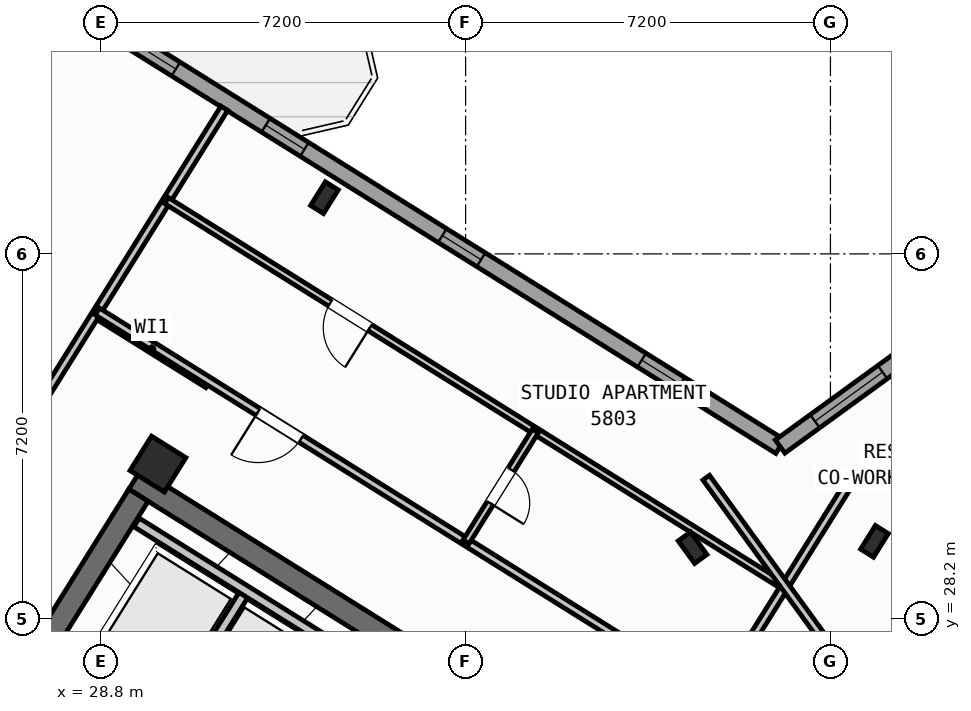
"""IFC4 building model, lengths in metres.
Left out: names, types, materials, properties, quantities, classifications, styles, units other than length and angle.
Written with IfcOpenShell. Run it as: python <this file> out.ifc"""

import sys

from ifc_helpers import new_model, si_unit, direction, frame, frame_2d, origin, origin_2d, place, context, subcontext, project, spatial, rectangle, hollow_rectangle, i_section, extrude, source, transform, mapped, element, fill, save


model = new_model("IFC4")
c1 = context("Model", 3, precision=1e-05, world=origin(), true_north=direction((0.0, 1.0)))
c2 = subcontext(c1, "Body", "Model", "MODEL_VIEW")
j1 = project(units=[si_unit("LENGTHUNIT", "METRE"), si_unit("PLANEANGLEUNIT", "RADIAN")], contexts=[c1])
p1 = place(None, origin())
s1 = spatial("IfcSite", under=j1, at=p1, CompositionType="ELEMENT")
p2 = place(p1, origin())
s2 = spatial("IfcBuilding", under=s1, at=p2, CompositionType="ELEMENT")
p3 = place(p2, frame((0.0, 0.0, 229.2)))
s3 = spatial("IfcBuildingStorey", under=s2, at=p3, CompositionType="ELEMENT", Elevation=229.2)
p4 = place(p3, frame((40.531, 24.036, 0.0), z_axis=(0.0, 0.0, 1.0), x_axis=(-0.848048787466, 0.529918157905, 0.0)))
e1 = element("IfcWall", 1, at=p4, inside=s3, PredefinedType="SHEAR", context=c2, shape_type="SweptSolid", body=[
    extrude(rectangle(XDim=13.04, YDim=0.45, at=frame_2d((6.52, 0.0))), origin(), (0.0, 0.0, 1.0), 4.22),
])
p5 = place(p3, frame((29.544, 30.636, 0.0), z_axis=(0.0, 0.0, 1.0), x_axis=(-0.529902075036, -0.848058836916, 0.0)))
e2 = element("IfcWall", 2, at=p5, inside=s3, PredefinedType="SHEAR", context=c2, shape_type="SweptSolid", body=[
    extrude(rectangle(XDim=3.625, YDim=0.45, at=frame_2d((1.812, 0.0))), origin(), (0.0, 0.0, 1.0), 4.22),
])
p6 = place(p3, frame((44.406, 24.172, 0.0), z_axis=(0.0, 0.0, 1.0), x_axis=(0.809012867805, 0.587790931986, 0.0)))
e3 = element("IfcWall", 3, at=p6, inside=s3, PredefinedType="SHEAR", context=c2, shape_type="SweptSolid", body=[
    extrude(rectangle(XDim=12.24, YDim=0.45, at=frame_2d((6.12, 0.0))), origin(), (0.0, 0.0, 1.0), 4.22),
])
m1 = source(origin(), c2, "Body", "SweptSolid", [
    extrude(i_section(OverallWidth=0.3, OverallDepth=0.55, WebThickness=0.015, FlangeThickness=0.029, at=origin_2d()), origin(), (0.0, 0.0, 1.0), 4.5),
])
for number, where, z_axis, x_axis in (
    (4, (44.068, 29.726, 0.0), (0.0, 0.0, 1.0), (-0.848, 0.53, 0.0)),
    (5, (33.213, 36.509, 0.0), (0.0, 0.0, 1.0), (-0.848, 0.53, 0.0)),
):
    element("IfcColumn", number, at=place(p3, frame(where, z_axis=z_axis, x_axis=x_axis)), inside=s3, PredefinedType="COLUMN", context=c2, shape_type="MappedRepresentation", body=[
        mapped(m1, transform((0.0, 0.0, 0.0), scale=1.0)),
    ])
m2 = source(origin(), c2, "Body", "SweptSolid", [
    extrude(hollow_rectangle(XDim=0.8, YDim=0.8, WallThickness=0.032, at=origin_2d()), origin(), (0.0, 0.0, 1.0), 4.5),
])
p7 = place(p3, frame((29.928, 31.251, 0.0), z_axis=(0.0, 0.0, 1.0), x_axis=(-0.848048096156, 0.529919264233, 0.0)))
e6 = element("IfcColumn", 6, at=p7, inside=s3, PredefinedType="COLUMN", context=c2, shape_type="MappedRepresentation", body=[
    mapped(m2, transform((0.0, 0.0, 0.0), scale=1.0)),
])
p8 = place(p3, frame((40.479, 29.601, 0.0), z_axis=(0.0, 0.0, 1.0), x_axis=(0.809016994375, 0.587785252292, 0.0)))
e7 = element("IfcColumn", 7, at=p8, inside=s3, PredefinedType="COLUMN", context=c2, shape_type="MappedRepresentation", body=[
    mapped(m1, transform((0.0, 0.0, 0.0), scale=1.0)),
])
p9 = place(p3, frame((31.76, 12.183, 0.0), z_axis=(0.0, 0.0, 1.0), x_axis=(-0.848047074256, 0.529920899612, 0.0)))
e8 = element("IfcWall", 8, at=p9, inside=s3, PredefinedType="STANDARD", context=c2, shape_type="SweptSolid", body=[
    extrude(rectangle(XDim=30.652, YDim=0.32, at=frame_2d((15.326, 0.0))), origin(), (0.0, 0.0, 1.0), 4.22),
])
p10 = place(p9, frame((14.966, 0.0, 0.0)))
e9 = element("IfcOpeningElement", 9, at=p10, cuts=e8, PredefinedType="OPENING", context=c2, shape_type="SweptSolid", body=[
    extrude(rectangle(XDim=1.2, YDim=2.15, at=frame_2d((0.6, 1.075))), frame((0.0, 0.17, 0.0), z_axis=(0.0, -1.0, 0.0), x_axis=(1.0, 0.0, 0.0)), (0.0, 0.0, 1.0), 0.34),
])
p11 = place(p9, frame((2.096, 0.0, 0.9)))
e10 = element("IfcOpeningElement", 10, at=p11, cuts=e8, PredefinedType="OPENING", context=c2, shape_type="SweptSolid", body=[
    extrude(rectangle(XDim=1.65, YDim=1.45, at=frame_2d((0.825, 0.725))), frame((0.0, 0.17, 0.0), z_axis=(0.0, -1.0, 0.0), x_axis=(1.0, 0.0, 0.0)), (0.0, 0.0, 1.0), 0.34),
])
p12 = place(p9, frame((6.771, 0.0, 0.9)))
e11 = element("IfcOpeningElement", 11, at=p12, cuts=e8, PredefinedType="OPENING", context=c2, shape_type="SweptSolid", body=[
    extrude(rectangle(XDim=1.65, YDim=1.45, at=frame_2d((0.825, 0.725))), frame((0.0, 0.17, 0.0), z_axis=(0.0, -1.0, 0.0), x_axis=(1.0, 0.0, 0.0)), (0.0, 0.0, 1.0), 0.34),
])
p13 = place(p9, frame((20.283, 0.0, 0.95)))
e12 = element("IfcOpeningElement", 12, at=p13, cuts=e8, PredefinedType="OPENING", context=c2, shape_type="SweptSolid", body=[
    extrude(rectangle(XDim=1.95, YDim=1.35, at=frame_2d((0.975, 0.675))), frame((0.0, 0.17, 0.0), z_axis=(0.0, -1.0, 0.0), x_axis=(1.0, 0.0, 0.0)), (0.0, 0.0, 1.0), 0.34),
])
p14 = place(p9, frame((27.208, 0.0, 1.0)))
e13 = element("IfcOpeningElement", 13, at=p14, cuts=e8, PredefinedType="OPENING", context=c2, shape_type="SweptSolid", body=[
    extrude(rectangle(XDim=0.9, YDim=1.25, at=frame_2d((0.45, 0.625))), frame((0.0, 0.17, 0.0), z_axis=(0.0, -1.0, 0.0), x_axis=(1.0, 0.0, 0.0)), (0.0, 0.0, 1.0), 0.34),
])
p15 = place(p3, frame((17.424, 47.083, 0.0), z_axis=(0.0, 0.0, 1.0), x_axis=(0.848049927979, -0.529916332693, 0.0)))
e14 = element("IfcWall", 14, at=p15, inside=s3, PredefinedType="STANDARD", context=c2, shape_type="SweptSolid", body=[
    extrude(rectangle(XDim=29.223, YDim=0.32, at=frame_2d((14.612, 0.0))), origin(), (0.0, 0.0, 1.0), 4.22),
])
p16 = place(p15, frame((3.709, 0.0, 0.0)))
e15 = element("IfcOpeningElement", 15, at=p16, cuts=e14, PredefinedType="OPENING", context=c2, shape_type="SweptSolid", body=[
    extrude(rectangle(XDim=1.05, YDim=2.15, at=frame_2d((0.525, 1.075))), frame((0.0, 0.17, 0.0), z_axis=(0.0, -1.0, 0.0), x_axis=(1.0, 0.0, 0.0)), (0.0, 0.0, 1.0), 0.34),
])
p17 = place(p15, frame((0.809, 0.0, 1.0)))
e16 = element("IfcOpeningElement", 16, at=p17, cuts=e14, PredefinedType="OPENING", context=c2, shape_type="SweptSolid", body=[
    extrude(rectangle(XDim=0.9, YDim=1.25, at=frame_2d((0.45, 0.625))), frame((0.0, 0.17, 0.0), z_axis=(0.0, -1.0, 0.0), x_axis=(1.0, 0.0, 0.0)), (0.0, 0.0, 1.0), 0.34),
])
p18 = place(p15, frame((13.811, 0.0, 0.9)))
e17 = element("IfcOpeningElement", 17, at=p18, cuts=e14, PredefinedType="OPENING", context=c2, shape_type="SweptSolid", body=[
    extrude(rectangle(XDim=1.35, YDim=1.45, at=frame_2d((0.675, 0.725))), frame((0.0, 0.17, 0.0), z_axis=(0.0, -1.0, 0.0), x_axis=(1.0, 0.0, 0.0)), (0.0, 0.0, 1.0), 0.34),
])
p19 = place(p15, frame((17.254, 0.0, 1.0)))
e18 = element("IfcOpeningElement", 18, at=p19, cuts=e14, PredefinedType="OPENING", context=c2, shape_type="SweptSolid", body=[
    extrude(rectangle(XDim=0.9, YDim=1.25, at=frame_2d((0.45, 0.625))), frame((0.0, 0.17, 0.0), z_axis=(0.0, -1.0, 0.0), x_axis=(1.0, 0.0, 0.0)), (0.0, 0.0, 1.0), 0.34),
])
p20 = place(p15, frame((21.364, 0.0, 1.0)))
e19 = element("IfcOpeningElement", 19, at=p20, cuts=e14, PredefinedType="OPENING", context=c2, shape_type="SweptSolid", body=[
    extrude(rectangle(XDim=0.9, YDim=1.25, at=frame_2d((0.45, 0.625))), frame((0.0, 0.17, 0.0), z_axis=(0.0, -1.0, 0.0), x_axis=(1.0, 0.0, 0.0)), (0.0, 0.0, 1.0), 0.34),
])
p21 = place(p15, frame((26.003, 0.0, 1.0)))
e20 = element("IfcOpeningElement", 20, at=p21, cuts=e14, PredefinedType="OPENING", context=c2, shape_type="SweptSolid", body=[
    extrude(rectangle(XDim=0.9, YDim=1.25, at=frame_2d((0.45, 0.625))), frame((0.0, 0.17, 0.0), z_axis=(0.0, -1.0, 0.0), x_axis=(1.0, 0.0, 0.0)), (0.0, 0.0, 1.0), 0.34),
])
p22 = place(p15, frame((11.211, 0.0, 1.0)))
e21 = element("IfcOpeningElement", 21, at=p22, cuts=e14, PredefinedType="OPENING", context=c2, shape_type="SweptSolid", body=[
    extrude(rectangle(XDim=0.65, YDim=1.15, at=frame_2d((0.325, 0.575))), frame((0.0, 0.17, 0.0), z_axis=(0.0, -1.0, 0.0), x_axis=(1.0, 0.0, 0.0)), (0.0, 0.0, 1.0), 0.34),
])
p23 = place(p15, frame((9.079, 0.0, 1.0)))
e22 = element("IfcOpeningElement", 22, at=p23, cuts=e14, PredefinedType="OPENING", context=c2, shape_type="SweptSolid", body=[
    extrude(rectangle(XDim=0.65, YDim=1.15, at=frame_2d((0.325, 0.575))), frame((0.0, 0.17, 0.0), z_axis=(0.0, -1.0, 0.0), x_axis=(1.0, 0.0, 0.0)), (0.0, 0.0, 1.0), 0.34),
])
p24 = place(p15, frame((6.951, 0.0, 1.0)))
e23 = element("IfcOpeningElement", 23, at=p24, cuts=e14, PredefinedType="OPENING", context=c2, shape_type="SweptSolid", body=[
    extrude(rectangle(XDim=0.65, YDim=1.15, at=frame_2d((0.325, 0.575))), frame((0.0, 0.17, 0.0), z_axis=(0.0, -1.0, 0.0), x_axis=(1.0, 0.0, 0.0)), (0.0, 0.0, 1.0), 0.34),
])
p25 = place(p3, frame((42.207, 31.597, 0.0), z_axis=(0.0, 0.0, 1.0), x_axis=(0.809020333377, 0.587780656523, 0.0)))
e24 = element("IfcWall", 24, at=p25, inside=s3, PredefinedType="STANDARD", context=c2, shape_type="SweptSolid", body=[
    extrude(rectangle(XDim=15.223, YDim=0.32, at=frame_2d((7.611, 0.0))), origin(), (0.0, 0.0, 1.0), 4.22),
])
p26 = place(p25, frame((12.82, 0.0, 0.0)))
e25 = element("IfcOpeningElement", 25, at=p26, cuts=e24, PredefinedType="OPENING", context=c2, shape_type="SweptSolid", body=[
    extrude(rectangle(XDim=1.05, YDim=2.15, at=frame_2d((0.525, 1.075))), frame((0.0, 0.17, 0.0), z_axis=(0.0, -1.0, 0.0), x_axis=(1.0, 0.0, 0.0)), (0.0, 0.0, 1.0), 0.34),
])
p27 = place(p25, frame((0.85, 0.0, 0.9)))
e26 = element("IfcOpeningElement", 26, at=p27, cuts=e24, PredefinedType="OPENING", context=c2, shape_type="SweptSolid", body=[
    extrude(rectangle(XDim=1.65, YDim=1.45, at=frame_2d((0.825, 0.725))), frame((0.0, 0.17, 0.0), z_axis=(0.0, -1.0, 0.0), x_axis=(1.0, 0.0, 0.0)), (0.0, 0.0, 1.0), 0.34),
])
p28 = place(p25, frame((5.769, 0.0, 0.9)))
e27 = element("IfcOpeningElement", 27, at=p28, cuts=e24, PredefinedType="OPENING", context=c2, shape_type="SweptSolid", body=[
    extrude(rectangle(XDim=1.35, YDim=1.45, at=frame_2d((0.675, 0.725))), frame((0.0, 0.17, 0.0), z_axis=(0.0, -1.0, 0.0), x_axis=(1.0, 0.0, 0.0)), (0.0, 0.0, 1.0), 0.34),
])
p29 = place(p25, frame((10.219, 0.0, 1.0)))
e28 = element("IfcOpeningElement", 28, at=p29, cuts=e24, PredefinedType="OPENING", context=c2, shape_type="SweptSolid", body=[
    extrude(rectangle(XDim=0.9, YDim=1.25, at=frame_2d((0.45, 0.625))), frame((0.0, 0.17, 0.0), z_axis=(0.0, -1.0, 0.0), x_axis=(1.0, 0.0, 0.0)), (0.0, 0.0, 1.0), 0.34),
])
p30 = place(p3, frame((31.645, 28.716, 0.0), z_axis=(0.0, 0.0, 1.0), x_axis=(-0.52986693015, -0.848080795876, 0.0)))
e29 = element("IfcWall", 29, at=p30, inside=s3, PredefinedType="STANDARD", context=c2, shape_type="SweptSolid", body=[
    extrude(rectangle(XDim=2.66, YDim=0.2, at=frame_2d((1.33, 0.0))), origin(), (0.0, 0.0, 1.0), 4.21),
])
p31 = place(p3, frame((33.363, 27.69, 0.0), z_axis=(0.0, 0.0, 1.0), x_axis=(-0.84804957148, 0.529916903215, 0.0)))
e30 = element("IfcWall", 30, at=p31, inside=s3, PredefinedType="STANDARD", context=c2, shape_type="SweptSolid", body=[
    extrude(rectangle(XDim=4.548, YDim=0.2, at=frame_2d((2.274, 0.0))), origin(), (0.0, 0.0, 1.0), 4.21),
])
p32 = place(p3, frame((30.914, 32.829, 0.0), z_axis=(0.0, 0.0, 1.0), x_axis=(-0.848008813643, 0.529982124211, 0.0)))
e31 = element("IfcWall", 31, at=p32, inside=s3, PredefinedType="PARTITIONING", context=c2, shape_type="SweptSolid", body=[
    extrude(rectangle(XDim=2.61, YDim=0.16, at=frame_2d((1.305, 0.0))), origin(), (0.0, 0.0, 1.0), 4.21),
])
p33 = place(p3, frame((31.239, 38.274, 0.0), z_axis=(0.0, 0.0, 1.0), x_axis=(-0.529921796515, -0.848046513806, 0.0)))
e32 = element("IfcWall", 32, at=p33, inside=s3, PredefinedType="PARTITIONING", context=c2, shape_type="SweptSolid", body=[
    extrude(rectangle(XDim=16.5, YDim=0.16, at=frame_2d((8.25, 0.0))), origin(), (0.0, 0.0, 1.0), 4.21),
])
p34 = place(p3, frame((41.936, 26.012, 0.0), z_axis=(0.0, 0.0, 1.0), x_axis=(-0.848051154596, 0.529914369676, 0.0)))
e33 = element("IfcWall", 33, at=p34, inside=s3, PredefinedType="PARTITIONING", context=c2, shape_type="SweptSolid", body=[
    extrude(rectangle(XDim=15.57, YDim=0.16, at=frame_2d((7.785, 0.0))), origin(), (0.0, 0.0, 1.0), 4.21),
])
p35 = place(p34, frame((10.83, 0.0, 0.0)))
e34 = element("IfcOpeningElement", 34, at=p35, cuts=e33, PredefinedType="OPENING", context=c2, shape_type="SweptSolid", body=[
    extrude(rectangle(XDim=1.0, YDim=2.1, at=frame_2d((0.5, 1.05))), frame((0.0, 0.09, 0.0), z_axis=(0.0, -1.0, 0.0), x_axis=(1.0, 0.0, 0.0)), (0.0, 0.0, 1.0), 0.18),
])
p36 = place(p3, frame((43.704, 31.086, 0.0), z_axis=(0.0, 0.0, 1.0), x_axis=(-0.529906828443, -0.848055866774, 0.0)))
e35 = element("IfcWall", 35, at=p36, inside=s3, PredefinedType="PARTITIONING", context=c2, shape_type="SweptSolid", body=[
    extrude(rectangle(XDim=5.48, YDim=0.16, at=frame_2d((2.74, 0.0))), origin(), (0.0, 0.0, 1.0), 4.21),
])
p37 = place(p3, frame((42.226, 28.873, 0.0), z_axis=(0.0, 0.0, 1.0), x_axis=(-0.848049134363, 0.529917602752, 0.0)))
e36 = element("IfcWall", 36, at=p37, inside=s3, PredefinedType="PLUMBINGWALL", context=c2, shape_type="SweptSolid", body=[
    extrude(rectangle(XDim=14.3, YDim=0.14, at=frame_2d((7.15, 0.0))), origin(), (0.0, 0.0, 1.0), 4.21),
])
p38 = place(p37, frame((9.57, 0.0, 0.0)))
e37 = element("IfcOpeningElement", 37, at=p38, cuts=e36, PredefinedType="OPENING", context=c2, shape_type="SweptSolid", body=[
    extrude(rectangle(XDim=0.92, YDim=2.08, at=frame_2d((0.46, 1.04))), frame((0.0, 0.08, 0.0), z_axis=(0.0, -1.0, 0.0), x_axis=(1.0, 0.0, 0.0)), (0.0, 0.0, 1.0), 0.16),
])
p39 = place(p3, frame((37.375, 31.904, 0.0), z_axis=(0.0, 0.0, 1.0), x_axis=(-0.529913878929, -0.848051461244, 0.0)))
e38 = element("IfcWall", 38, at=p39, inside=s3, PredefinedType="PLUMBINGWALL", context=c2, shape_type="SweptSolid", body=[
    extrude(rectangle(XDim=2.58, YDim=0.14, at=frame_2d((1.29, 0.0))), origin(), (0.0, 0.0, 1.0), 4.21),
])
p40 = place(p39, frame((0.9, 0.0, 0.0)))
e39 = element("IfcOpeningElement", 39, at=p40, cuts=e38, PredefinedType="OPENING", context=c2, shape_type="SweptSolid", body=[
    extrude(rectangle(XDim=0.78, YDim=2.05, at=frame_2d((0.39, 1.025))), frame((0.0, 0.08, 0.0), z_axis=(0.0, -1.0, 0.0), x_axis=(1.0, 0.0, 0.0)), (0.0, 0.0, 1.0), 0.16),
])
p41 = place(p3, frame((42.866, 26.044, 0.0), z_axis=(0.0, 0.0, 1.0), x_axis=(0.809020254154, 0.587780765566, 0.0)))
e40 = element("IfcWall", 40, at=p41, inside=s3, PredefinedType="PARTITIONING", context=c2, shape_type="SweptSolid", body=[
    extrude(rectangle(XDim=14.67, YDim=0.16, at=frame_2d((7.335, 0.0))), origin(), (0.0, 0.0, 1.0), 4.21),
])
p42 = place(p41, frame((3.215, 0.0, 0.0)))
e41 = element("IfcOpeningElement", 41, at=p42, cuts=e40, PredefinedType="OPENING", context=c2, shape_type="SweptSolid", body=[
    extrude(rectangle(XDim=1.0, YDim=2.1, at=frame_2d((0.5, 1.05))), frame((0.0, 0.09, 0.0), z_axis=(0.0, -1.0, 0.0), x_axis=(1.0, 0.0, 0.0)), (0.0, 0.0, 1.0), 0.18),
])
p43 = place(p41, frame((9.915, 0.0, 0.0)))
e42 = element("IfcOpeningElement", 42, at=p43, cuts=e40, PredefinedType="OPENING", context=c2, shape_type="SweptSolid", body=[
    extrude(rectangle(XDim=1.0, YDim=2.1, at=frame_2d((0.5, 1.05))), frame((0.0, 0.09, 0.0), z_axis=(0.0, -1.0, 0.0), x_axis=(1.0, 0.0, 0.0)), (0.0, 0.0, 1.0), 0.18),
])
p44 = place(p3, frame((43.969, 26.55, 0.0), z_axis=(0.0, 0.0, 1.0), x_axis=(-0.587776919386, 0.80902304852, 0.0)))
e43 = element("IfcWall", 43, at=p44, inside=s3, PredefinedType="PARTITIONING", context=c2, shape_type="SweptSolid", body=[
    extrude(rectangle(XDim=5.48, YDim=0.16, at=frame_2d((2.74, 0.0))), origin(), (0.0, 0.0, 1.0), 4.21),
])
m3 = source(origin(), c2, "Body", "SweptSolid", [
    extrude(rectangle(XDim=1.35, YDim=1.45, at=frame_2d((0.675, 0.725))), frame((0.0, 0.03, 0.0), z_axis=(0.0, -1.0, 0.0), x_axis=(1.0, 0.0, 0.0)), (0.0, 0.0, 1.0), 0.06),
])
p45 = place(p18, origin())
e44 = element("IfcWindow", 44, at=p45, inside=s3, PartitioningType="SINGLE_PANEL", PredefinedType="WINDOW", context=c2, shape_type="MappedRepresentation", body=[
    mapped(m3, transform((0.0, 0.0, 0.0), scale=1.0)),
])
fill(e17, e44)
m4 = source(origin(), c2, "Body", "SweptSolid", [
    extrude(rectangle(XDim=0.9, YDim=1.25, at=frame_2d((0.45, 0.625))), frame((0.0, 0.03, 0.0), z_axis=(0.0, -1.0, 0.0), x_axis=(1.0, 0.0, 0.0)), (0.0, 0.0, 1.0), 0.06),
])
p46 = place(p19, origin())
e45 = element("IfcWindow", 45, at=p46, inside=s3, PartitioningType="SINGLE_PANEL", PredefinedType="WINDOW", context=c2, shape_type="MappedRepresentation", body=[
    mapped(m4, transform((0.0, 0.0, 0.0), scale=1.0)),
])
fill(e18, e45)
p47 = place(p20, origin())
e46 = element("IfcWindow", 46, at=p47, inside=s3, PartitioningType="SINGLE_PANEL", PredefinedType="WINDOW", context=c2, shape_type="MappedRepresentation", body=[
    mapped(m4, transform((0.0, 0.0, 0.0), scale=1.0)),
])
fill(e19, e46)
p48 = place(p21, origin())
e47 = element("IfcWindow", 47, at=p48, inside=s3, PartitioningType="SINGLE_PANEL", PredefinedType="WINDOW", context=c2, shape_type="MappedRepresentation", body=[
    mapped(m4, transform((0.0, 0.0, 0.0), scale=1.0)),
])
fill(e20, e47)
m5 = source(origin(), c2, "Body", "SweptSolid", [
    extrude(rectangle(XDim=1.65, YDim=1.45, at=frame_2d((0.825, 0.725))), frame((0.0, 0.03, 0.0), z_axis=(0.0, -1.0, 0.0), x_axis=(1.0, 0.0, 0.0)), (0.0, 0.0, 1.0), 0.06),
])
p49 = place(p27, origin())
e48 = element("IfcWindow", 48, at=p49, inside=s3, PartitioningType="SINGLE_PANEL", PredefinedType="WINDOW", context=c2, shape_type="MappedRepresentation", body=[
    mapped(m5, transform((0.0, 0.0, 0.0), scale=1.0)),
])
fill(e26, e48)
m6 = source(origin(), c2, "Body", "SweptSolid", [
    extrude(rectangle(XDim=1.0, YDim=2.1, at=frame_2d((0.5, 1.05))), frame((0.0, 0.025, 0.0), z_axis=(0.0, -1.0, 0.0), x_axis=(1.0, 0.0, 0.0)), (0.0, 0.0, 1.0), 0.05),
])
p50 = place(p35, origin())
e49 = element("IfcDoor", 49, at=p50, inside=s3, OperationType="SINGLE_SWING_RIGHT", PredefinedType="DOOR", context=c2, shape_type="MappedRepresentation", body=[
    mapped(m6, transform((0.0, 0.0, 0.0), scale=1.0)),
])
fill(e34, e49)
m7 = source(origin(), c2, "Body", "SweptSolid", [
    extrude(rectangle(XDim=0.92, YDim=2.08, at=frame_2d((0.46, 1.04))), frame((0.0, 0.025, 0.0), z_axis=(0.0, -1.0, 0.0), x_axis=(1.0, 0.0, 0.0)), (0.0, 0.0, 1.0), 0.05),
])
p51 = place(p38, origin())
e50 = element("IfcDoor", 50, at=p51, inside=s3, OperationType="SINGLE_SWING_LEFT", PredefinedType="DOOR", context=c2, shape_type="MappedRepresentation", body=[
    mapped(m7, transform((0.0, 0.0, 0.0), scale=1.0)),
])
fill(e37, e50)
m8 = source(origin(), c2, "Body", "SweptSolid", [
    extrude(rectangle(XDim=0.78, YDim=2.05, at=frame_2d((0.39, 1.025))), frame((0.0, 0.025, 0.0), z_axis=(0.0, -1.0, 0.0), x_axis=(1.0, 0.0, 0.0)), (0.0, 0.0, 1.0), 0.05),
])
p52 = place(p40, origin())
e51 = element("IfcDoor", 51, at=p52, inside=s3, OperationType="SINGLE_SWING_RIGHT", PredefinedType="DOOR", context=c2, shape_type="MappedRepresentation", body=[
    mapped(m8, transform((0.0, 0.0, 0.0), scale=1.0)),
])
fill(e39, e51)
save(model, sys.argv[1])
